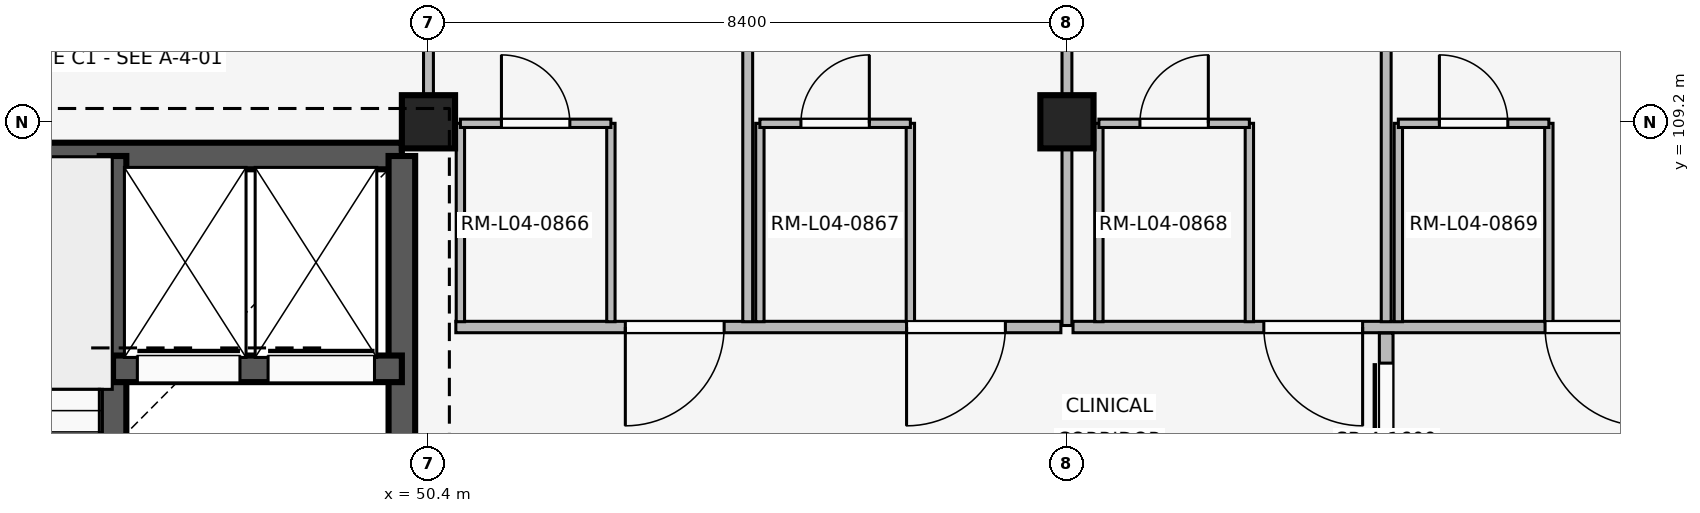
"""IFC4 building model, lengths in metres.
Left out: names, types, materials, properties, quantities, classifications, styles, units other than length and angle.
Written with IfcOpenShell. Run it as: python <this file> out.ifc"""

import sys

from ifc_helpers import new_model, si_unit, direction, frame, frame_2d, origin, origin_2d, place, context, subcontext, project, spatial, rectangle, extrude, element, fill, save


model = new_model("IFC4")
c1 = context("Model", 3, precision=1e-05, world=origin(), true_north=direction((0.0, 1.0)))
c2 = subcontext(c1, "Body", "Model", "MODEL_VIEW")
j1 = project(units=[si_unit("LENGTHUNIT", "METRE"), si_unit("PLANEANGLEUNIT", "RADIAN")], contexts=[c1])
p1 = place(None, origin())
s1 = spatial("IfcSite", under=j1, at=p1, CompositionType="ELEMENT")
p2 = place(p1, origin())
s2 = spatial("IfcBuilding", under=s1, at=p2, CompositionType="ELEMENT")
p3 = place(p2, frame((0.0, 0.0, 16.2)))
s3 = spatial("IfcBuildingStorey", under=s2, at=p3, CompositionType="ELEMENT", Elevation=16.2)
for number, where, z_axis, x_axis in (
    (1, (50.4, 109.2, 0.0), (0.0, 0.0, 1.0), (1.0, 0.0, 0.0)),
    (2, (58.8, 109.2, 0.0), (0.0, 0.0, 1.0), (1.0, 0.0, 0.0)),
):
    element("IfcColumn", number, at=place(p3, frame(where, z_axis=z_axis, x_axis=x_axis)), inside=s3, PredefinedType="COLUMN", context=c2, shape_type="SweptSolid", body=[
        extrude(rectangle(XDim=0.7, YDim=0.7, at=origin_2d()), origin(), (0.0, 0.0, 1.0), 4.2),
    ])
p4 = place(p3, frame((42.55, 108.75, 0.0), z_axis=(0.0, 0.0, 1.0), x_axis=(1.0, 0.0, 0.0)))
e3 = element("IfcWall", 3, at=p4, inside=s3, PredefinedType="SHEAR", context=c2, shape_type="SweptSolid", body=[
    extrude(rectangle(XDim=7.5, YDim=0.35, at=frame_2d((3.75, 0.0))), origin(), (0.0, 0.0, 1.0), 3.92),
])
p5 = place(p3, frame((50.05, 101.2, 0.0), z_axis=(0.0, 0.0, 1.0), x_axis=(0.0, 1.0, 0.0)))
e4 = element("IfcWall", 4, at=p5, inside=s3, PredefinedType="SHEAR", context=c2, shape_type="SweptSolid", body=[
    extrude(rectangle(XDim=7.55, YDim=0.35, at=frame_2d((3.775, 0.0))), origin(), (0.0, 0.0, 1.0), 3.92),
])
p6 = place(p5, frame((2.4, 0.0, 0.0)))
e5 = element("IfcOpeningElement", 5, at=p6, cuts=e4, PredefinedType="OPENING", context=c2, shape_type="SweptSolid", body=[
    extrude(rectangle(XDim=1.2, YDim=2.2, at=frame_2d((0.6, 1.1))), frame((0.0, 0.185, 0.0), z_axis=(0.0, -1.0, 0.0), x_axis=(1.0, 0.0, 0.0)), (0.0, 0.0, 1.0), 0.37),
])
p7 = place(p3, frame((46.25, 101.2, 0.0), z_axis=(0.0, 0.0, 1.0), x_axis=(0.0, 1.0, 0.0)))
e6 = element("IfcWall", 6, at=p7, inside=s3, PredefinedType="SHEAR", context=c2, shape_type="SweptSolid", body=[
    extrude(rectangle(XDim=7.55, YDim=0.35, at=frame_2d((3.775, 0.0))), origin(), (0.0, 0.0, 1.0), 3.92),
])
p8 = place(p7, frame((0.28, 0.0, 0.0)))
e7 = element("IfcOpeningElement", 7, at=p8, cuts=e6, PredefinedType="OPENING", context=c2, shape_type="SweptSolid", body=[
    extrude(rectangle(XDim=1.0, YDim=2.15, at=frame_2d((0.5, 1.075))), frame((0.0, 0.185, 0.0), z_axis=(0.0, -1.0, 0.0), x_axis=(1.0, 0.0, 0.0)), (0.0, 0.0, 1.0), 0.37),
])
p9 = place(p3, frame((46.25, 105.95, 0.0), z_axis=(0.0, 0.0, 1.0), x_axis=(1.0, 0.0, 0.0)))
e8 = element("IfcWall", 8, at=p9, inside=s3, PredefinedType="SHEAR", context=c2, shape_type="SweptSolid", body=[
    extrude(rectangle(XDim=3.8, YDim=0.35, at=frame_2d((1.9, 0.0))), origin(), (0.0, 0.0, 1.0), 3.92),
])
p10 = place(p9, frame((0.32, 0.0, 0.0)))
e9 = element("IfcOpeningElement", 9, at=p10, cuts=e8, PredefinedType="OPENING", context=c2, shape_type="SweptSolid", body=[
    extrude(rectangle(XDim=1.35, YDim=2.25, at=frame_2d((0.675, 1.125))), frame((0.0, 0.185, 0.0), z_axis=(0.0, -1.0, 0.0), x_axis=(1.0, 0.0, 0.0)), (0.0, 0.0, 1.0), 0.37),
])
p11 = place(p9, frame((2.04, 0.0, 0.0)))
e10 = element("IfcOpeningElement", 10, at=p11, cuts=e8, PredefinedType="OPENING", context=c2, shape_type="SweptSolid", body=[
    extrude(rectangle(XDim=1.4, YDim=2.25, at=frame_2d((0.7, 1.125))), frame((0.0, 0.185, 0.0), z_axis=(0.0, -1.0, 0.0), x_axis=(1.0, 0.0, 0.0)), (0.0, 0.0, 1.0), 0.37),
])
p12 = place(p3, frame((50.4, 109.55, 0.0), z_axis=(0.0, 0.0, 1.0), x_axis=(0.0, 1.0, 0.0)))
e11 = element("IfcWall", 11, at=p12, inside=s3, PredefinedType="PARTITIONING", context=c2, shape_type="SweptSolid", body=[
    extrude(rectangle(XDim=7.91, YDim=0.13, at=frame_2d((3.955, 0.0))), origin(), (0.0, 0.0, 1.0), 3.3),
])
p13 = place(p12, frame((3.4, 0.0, 0.0)))
e12 = element("IfcOpeningElement", 12, at=p13, cuts=e11, PredefinedType="OPENING", context=c2, shape_type="SweptSolid", body=[
    extrude(rectangle(XDim=1.05, YDim=2.2, at=frame_2d((0.525, 1.1))), frame((0.0, 0.075, 0.0), z_axis=(0.0, -1.0, 0.0), x_axis=(1.0, 0.0, 0.0)), (0.0, 0.0, 1.0), 0.15),
])
p14 = place(p3, frame((58.72, 106.5, 0.0), z_axis=(0.0, 0.0, 1.0), x_axis=(-1.0, 0.0, 0.0)))
e13 = element("IfcWall", 13, at=p14, inside=s3, PredefinedType="PARTITIONING", context=c2, shape_type="SweptSolid", body=[
    extrude(rectangle(XDim=7.96, YDim=0.15, at=frame_2d((3.98, 0.0))), origin(), (0.0, 0.0, 1.0), 3.3),
])
p15 = place(p14, frame((0.73, 0.0, 0.0)))
e14 = element("IfcOpeningElement", 14, at=p15, cuts=e13, PredefinedType="OPENING", context=c2, shape_type="SweptSolid", body=[
    extrude(rectangle(XDim=1.3, YDim=2.25, at=frame_2d((0.65, 1.125))), frame((0.0, 0.085, 0.0), z_axis=(0.0, -1.0, 0.0), x_axis=(1.0, 0.0, 0.0)), (0.0, 0.0, 1.0), 0.17),
])
p16 = place(p14, frame((4.43, 0.0, 0.0)))
e15 = element("IfcOpeningElement", 15, at=p16, cuts=e13, PredefinedType="OPENING", context=c2, shape_type="SweptSolid", body=[
    extrude(rectangle(XDim=1.3, YDim=2.25, at=frame_2d((0.65, 1.125))), frame((0.0, 0.085, 0.0), z_axis=(0.0, -1.0, 0.0), x_axis=(1.0, 0.0, 0.0)), (0.0, 0.0, 1.0), 0.17),
])
p17 = place(p3, frame((54.6, 106.57, 0.0), z_axis=(0.0, 0.0, 1.0), x_axis=(0.0, 1.0, 0.0)))
e16 = element("IfcWall", 16, at=p17, inside=s3, PredefinedType="PARTITIONING", context=c2, shape_type="SweptSolid", body=[
    extrude(rectangle(XDim=10.93, YDim=0.13, at=frame_2d((5.465, 0.0))), origin(), (0.0, 0.0, 1.0), 3.3),
])
for number, where, z_axis, x_axis in (
    (17, (50.82, 106.57, 0.0), (0.0, 0.0, 1.0), (0.0, 1.0, 0.0)),
    (18, (52.8, 106.57, 0.0), (0.0, 0.0, 1.0), (0.0, 1.0, 0.0)),
):
    element("IfcWall", number, at=place(p3, frame(where, z_axis=z_axis, x_axis=x_axis)), inside=s3, PredefinedType="PARTITIONING", context=c2, shape_type="SweptSolid", body=[
        extrude(rectangle(XDim=2.61, YDim=0.11, at=frame_2d((1.305, 0.0))), origin(), (0.0, 0.0, 1.0), 3.3),
    ])
p18 = place(p3, frame((50.82, 109.18, 0.0), z_axis=(0.0, 0.0, 1.0), x_axis=(1.0, 0.0, 0.0)))
e19 = element("IfcWall", 19, at=p18, inside=s3, PredefinedType="PARTITIONING", context=c2, shape_type="SweptSolid", body=[
    extrude(rectangle(XDim=1.98, YDim=0.11, at=frame_2d((0.99, 0.0))), origin(), (0.0, 0.0, 1.0), 3.3),
])
p19 = place(p18, frame((0.54, 0.0, 0.0)))
e20 = element("IfcOpeningElement", 20, at=p19, cuts=e19, PredefinedType="OPENING", context=c2, shape_type="SweptSolid", body=[
    extrude(rectangle(XDim=0.9, YDim=2.1, at=frame_2d((0.45, 1.05))), frame((0.0, 0.065, 0.0), z_axis=(0.0, -1.0, 0.0), x_axis=(1.0, 0.0, 0.0)), (0.0, 0.0, 1.0), 0.13),
])
for number, where, z_axis, x_axis in (
    (21, (54.76, 106.57, 0.0), (0.0, 0.0, 1.0), (0.0, 1.0, 0.0)),
    (22, (56.74, 106.57, 0.0), (0.0, 0.0, 1.0), (0.0, 1.0, 0.0)),
):
    element("IfcWall", number, at=place(p3, frame(where, z_axis=z_axis, x_axis=x_axis)), inside=s3, PredefinedType="PARTITIONING", context=c2, shape_type="SweptSolid", body=[
        extrude(rectangle(XDim=2.61, YDim=0.11, at=frame_2d((1.305, 0.0))), origin(), (0.0, 0.0, 1.0), 3.3),
    ])
p20 = place(p3, frame((54.76, 109.18, 0.0), z_axis=(0.0, 0.0, 1.0), x_axis=(1.0, 0.0, 0.0)))
e23 = element("IfcWall", 23, at=p20, inside=s3, PredefinedType="PARTITIONING", context=c2, shape_type="SweptSolid", body=[
    extrude(rectangle(XDim=1.98, YDim=0.11, at=frame_2d((0.99, 0.0))), origin(), (0.0, 0.0, 1.0), 3.3),
])
p21 = place(p20, frame((0.54, 0.0, 0.0)))
e24 = element("IfcOpeningElement", 24, at=p21, cuts=e23, PredefinedType="OPENING", context=c2, shape_type="SweptSolid", body=[
    extrude(rectangle(XDim=0.9, YDim=2.1, at=frame_2d((0.45, 1.05))), frame((0.0, 0.065, 0.0), z_axis=(0.0, -1.0, 0.0), x_axis=(1.0, 0.0, 0.0)), (0.0, 0.0, 1.0), 0.13),
])
p22 = place(p3, frame((58.8, 106.52, 0.0), z_axis=(0.0, 0.0, 1.0), x_axis=(0.0, 1.0, 0.0)))
e25 = element("IfcWall", 25, at=p22, inside=s3, PredefinedType="PARTITIONING", context=c2, shape_type="SweptSolid", body=[
    extrude(rectangle(XDim=10.94, YDim=0.13, at=frame_2d((5.47, 0.0))), origin(), (0.0, 0.0, 1.0), 3.3),
])
p23 = place(p3, frame((67.12, 106.5, 0.0), z_axis=(0.0, 0.0, 1.0), x_axis=(-1.0, 0.0, 0.0)))
e26 = element("IfcWall", 26, at=p23, inside=s3, PredefinedType="PARTITIONING", context=c2, shape_type="SweptSolid", body=[
    extrude(rectangle(XDim=8.24, YDim=0.15, at=frame_2d((4.12, 0.0))), origin(), (0.0, 0.0, 1.0), 3.3),
])
p24 = place(p23, frame((0.73, 0.0, 0.0)))
e27 = element("IfcOpeningElement", 27, at=p24, cuts=e26, PredefinedType="OPENING", context=c2, shape_type="SweptSolid", body=[
    extrude(rectangle(XDim=1.3, YDim=2.25, at=frame_2d((0.65, 1.125))), frame((0.0, 0.085, 0.0), z_axis=(0.0, -1.0, 0.0), x_axis=(1.0, 0.0, 0.0)), (0.0, 0.0, 1.0), 0.17),
])
p25 = place(p23, frame((4.43, 0.0, 0.0)))
e28 = element("IfcOpeningElement", 28, at=p25, cuts=e26, PredefinedType="OPENING", context=c2, shape_type="SweptSolid", body=[
    extrude(rectangle(XDim=1.3, YDim=2.25, at=frame_2d((0.65, 1.125))), frame((0.0, 0.085, 0.0), z_axis=(0.0, -1.0, 0.0), x_axis=(1.0, 0.0, 0.0)), (0.0, 0.0, 1.0), 0.17),
])
p26 = place(p3, frame((63.0, 106.57, 0.0), z_axis=(0.0, 0.0, 1.0), x_axis=(0.0, 1.0, 0.0)))
e29 = element("IfcWall", 29, at=p26, inside=s3, PredefinedType="PARTITIONING", context=c2, shape_type="SweptSolid", body=[
    extrude(rectangle(XDim=10.93, YDim=0.13, at=frame_2d((5.465, 0.0))), origin(), (0.0, 0.0, 1.0), 3.3),
])
for number, where, z_axis, x_axis in (
    (30, (59.22, 106.57, 0.0), (0.0, 0.0, 1.0), (0.0, 1.0, 0.0)),
    (31, (61.2, 106.57, 0.0), (0.0, 0.0, 1.0), (0.0, 1.0, 0.0)),
):
    element("IfcWall", number, at=place(p3, frame(where, z_axis=z_axis, x_axis=x_axis)), inside=s3, PredefinedType="PARTITIONING", context=c2, shape_type="SweptSolid", body=[
        extrude(rectangle(XDim=2.61, YDim=0.11, at=frame_2d((1.305, 0.0))), origin(), (0.0, 0.0, 1.0), 3.3),
    ])
p27 = place(p3, frame((59.22, 109.18, 0.0), z_axis=(0.0, 0.0, 1.0), x_axis=(1.0, 0.0, 0.0)))
e32 = element("IfcWall", 32, at=p27, inside=s3, PredefinedType="PARTITIONING", context=c2, shape_type="SweptSolid", body=[
    extrude(rectangle(XDim=1.98, YDim=0.11, at=frame_2d((0.99, 0.0))), origin(), (0.0, 0.0, 1.0), 3.3),
])
p28 = place(p27, frame((0.54, 0.0, 0.0)))
e33 = element("IfcOpeningElement", 33, at=p28, cuts=e32, PredefinedType="OPENING", context=c2, shape_type="SweptSolid", body=[
    extrude(rectangle(XDim=0.9, YDim=2.1, at=frame_2d((0.45, 1.05))), frame((0.0, 0.065, 0.0), z_axis=(0.0, -1.0, 0.0), x_axis=(1.0, 0.0, 0.0)), (0.0, 0.0, 1.0), 0.13),
])
for number, where, z_axis, x_axis in (
    (34, (63.16, 106.57, 0.0), (0.0, 0.0, 1.0), (0.0, 1.0, 0.0)),
    (35, (65.14, 106.57, 0.0), (0.0, 0.0, 1.0), (0.0, 1.0, 0.0)),
):
    element("IfcWall", number, at=place(p3, frame(where, z_axis=z_axis, x_axis=x_axis)), inside=s3, PredefinedType="PARTITIONING", context=c2, shape_type="SweptSolid", body=[
        extrude(rectangle(XDim=2.61, YDim=0.11, at=frame_2d((1.305, 0.0))), origin(), (0.0, 0.0, 1.0), 3.3),
    ])
p29 = place(p3, frame((63.16, 109.18, 0.0), z_axis=(0.0, 0.0, 1.0), x_axis=(1.0, 0.0, 0.0)))
e36 = element("IfcWall", 36, at=p29, inside=s3, PredefinedType="PARTITIONING", context=c2, shape_type="SweptSolid", body=[
    extrude(rectangle(XDim=1.98, YDim=0.11, at=frame_2d((0.99, 0.0))), origin(), (0.0, 0.0, 1.0), 3.3),
])
p30 = place(p29, frame((0.54, 0.0, 0.0)))
e37 = element("IfcOpeningElement", 37, at=p30, cuts=e36, PredefinedType="OPENING", context=c2, shape_type="SweptSolid", body=[
    extrude(rectangle(XDim=0.9, YDim=2.1, at=frame_2d((0.45, 1.05))), frame((0.0, 0.065, 0.0), z_axis=(0.0, -1.0, 0.0), x_axis=(1.0, 0.0, 0.0)), (0.0, 0.0, 1.0), 0.13),
])
p31 = place(p3, frame((63.0, 103.58, 0.0), z_axis=(0.0, 0.0, 1.0), x_axis=(0.0, 1.0, 0.0)))
e38 = element("IfcWall", 38, at=p31, inside=s3, PredefinedType="PARTITIONING", context=c2, shape_type="SweptSolid", body=[
    extrude(rectangle(XDim=2.84, YDim=0.18, at=frame_2d((1.42, 0.0))), origin(), (0.0, 0.0, 1.0), 3.3),
])
p32 = place(p31, frame((0.395, 0.0, 0.0)))
e39 = element("IfcOpeningElement", 39, at=p32, cuts=e38, PredefinedType="OPENING", context=c2, shape_type="SweptSolid", body=[
    extrude(rectangle(XDim=2.05, YDim=2.35, at=frame_2d((1.025, 1.175))), frame((0.0, 0.1, 0.0), z_axis=(0.0, -1.0, 0.0), x_axis=(1.0, 0.0, 0.0)), (0.0, 0.0, 1.0), 0.2),
])
p33 = place(p10, origin())
e40 = element("IfcDoor", 40, at=p33, inside=s3, OperationType="SLIDING_TO_LEFT", PredefinedType="DOOR", context=c2, shape_type="SweptSolid", body=[
    extrude(rectangle(XDim=1.35, YDim=2.25, at=frame_2d((0.675, 1.125))), frame((0.0, 0.025, 0.0), z_axis=(0.0, -1.0, 0.0), x_axis=(1.0, 0.0, 0.0)), (0.0, 0.0, 1.0), 0.05),
])
fill(e9, e40)
p34 = place(p11, origin())
e41 = element("IfcDoor", 41, at=p34, inside=s3, OperationType="SLIDING_TO_LEFT", PredefinedType="DOOR", context=c2, shape_type="SweptSolid", body=[
    extrude(rectangle(XDim=1.4, YDim=2.25, at=frame_2d((0.7, 1.125))), frame((0.0, 0.025, 0.0), z_axis=(0.0, -1.0, 0.0), x_axis=(1.0, 0.0, 0.0)), (0.0, 0.0, 1.0), 0.05),
])
fill(e10, e41)
p35 = place(p15, origin())
e42 = element("IfcDoor", 42, at=p35, inside=s3, OperationType="SINGLE_SWING_RIGHT", PredefinedType="DOOR", context=c2, shape_type="SweptSolid", body=[
    extrude(rectangle(XDim=1.3, YDim=2.25, at=frame_2d((0.65, 1.125))), frame((0.0, 0.025, 0.0), z_axis=(0.0, -1.0, 0.0), x_axis=(1.0, 0.0, 0.0)), (0.0, 0.0, 1.0), 0.05),
])
fill(e14, e42)
p36 = place(p16, origin())
e43 = element("IfcDoor", 43, at=p36, inside=s3, OperationType="SINGLE_SWING_RIGHT", PredefinedType="DOOR", context=c2, shape_type="SweptSolid", body=[
    extrude(rectangle(XDim=1.3, YDim=2.25, at=frame_2d((0.65, 1.125))), frame((0.0, 0.025, 0.0), z_axis=(0.0, -1.0, 0.0), x_axis=(1.0, 0.0, 0.0)), (0.0, 0.0, 1.0), 0.05),
])
fill(e15, e43)
p37 = place(p19, origin())
e44 = element("IfcDoor", 44, at=p37, inside=s3, OperationType="SINGLE_SWING_LEFT", PredefinedType="DOOR", context=c2, shape_type="SweptSolid", body=[
    extrude(rectangle(XDim=0.9, YDim=2.1, at=frame_2d((0.45, 1.05))), frame((0.0, 0.025, 0.0), z_axis=(0.0, -1.0, 0.0), x_axis=(1.0, 0.0, 0.0)), (0.0, 0.0, 1.0), 0.05),
])
fill(e20, e44)
p38 = place(p21, origin())
e45 = element("IfcDoor", 45, at=p38, inside=s3, OperationType="SINGLE_SWING_RIGHT", PredefinedType="DOOR", context=c2, shape_type="SweptSolid", body=[
    extrude(rectangle(XDim=0.9, YDim=2.1, at=frame_2d((0.45, 1.05))), frame((0.0, 0.025, 0.0), z_axis=(0.0, -1.0, 0.0), x_axis=(1.0, 0.0, 0.0)), (0.0, 0.0, 1.0), 0.05),
])
fill(e24, e45)
p39 = place(p24, origin())
e46 = element("IfcDoor", 46, at=p39, inside=s3, OperationType="SINGLE_SWING_LEFT", PredefinedType="DOOR", context=c2, shape_type="SweptSolid", body=[
    extrude(rectangle(XDim=1.3, YDim=2.25, at=frame_2d((0.65, 1.125))), frame((0.0, 0.025, 0.0), z_axis=(0.0, -1.0, 0.0), x_axis=(1.0, 0.0, 0.0)), (0.0, 0.0, 1.0), 0.05),
])
fill(e27, e46)
p40 = place(p25, origin())
e47 = element("IfcDoor", 47, at=p40, inside=s3, OperationType="SINGLE_SWING_LEFT", PredefinedType="DOOR", context=c2, shape_type="SweptSolid", body=[
    extrude(rectangle(XDim=1.3, YDim=2.25, at=frame_2d((0.65, 1.125))), frame((0.0, 0.025, 0.0), z_axis=(0.0, -1.0, 0.0), x_axis=(1.0, 0.0, 0.0)), (0.0, 0.0, 1.0), 0.05),
])
fill(e28, e47)
p41 = place(p28, origin())
e48 = element("IfcDoor", 48, at=p41, inside=s3, OperationType="SINGLE_SWING_RIGHT", PredefinedType="DOOR", context=c2, shape_type="SweptSolid", body=[
    extrude(rectangle(XDim=0.9, YDim=2.1, at=frame_2d((0.45, 1.05))), frame((0.0, 0.025, 0.0), z_axis=(0.0, -1.0, 0.0), x_axis=(1.0, 0.0, 0.0)), (0.0, 0.0, 1.0), 0.05),
])
fill(e33, e48)
p42 = place(p30, origin())
e49 = element("IfcDoor", 49, at=p42, inside=s3, OperationType="SINGLE_SWING_LEFT", PredefinedType="DOOR", context=c2, shape_type="SweptSolid", body=[
    extrude(rectangle(XDim=0.9, YDim=2.1, at=frame_2d((0.45, 1.05))), frame((0.0, 0.025, 0.0), z_axis=(0.0, -1.0, 0.0), x_axis=(1.0, 0.0, 0.0)), (0.0, 0.0, 1.0), 0.05),
])
fill(e37, e49)
p43 = place(p32, origin())
e50 = element("IfcDoor", 50, at=p43, inside=s3, OperationType="SLIDING_TO_LEFT", PredefinedType="DOOR", context=c2, shape_type="SweptSolid", body=[
    extrude(rectangle(XDim=2.05, YDim=2.35, at=frame_2d((1.025, 1.175))), frame((0.0, 0.025, 0.0), z_axis=(0.0, -1.0, 0.0), x_axis=(1.0, 0.0, 0.0)), (0.0, 0.0, 1.0), 0.05),
])
fill(e39, e50)
save(model, sys.argv[1])
